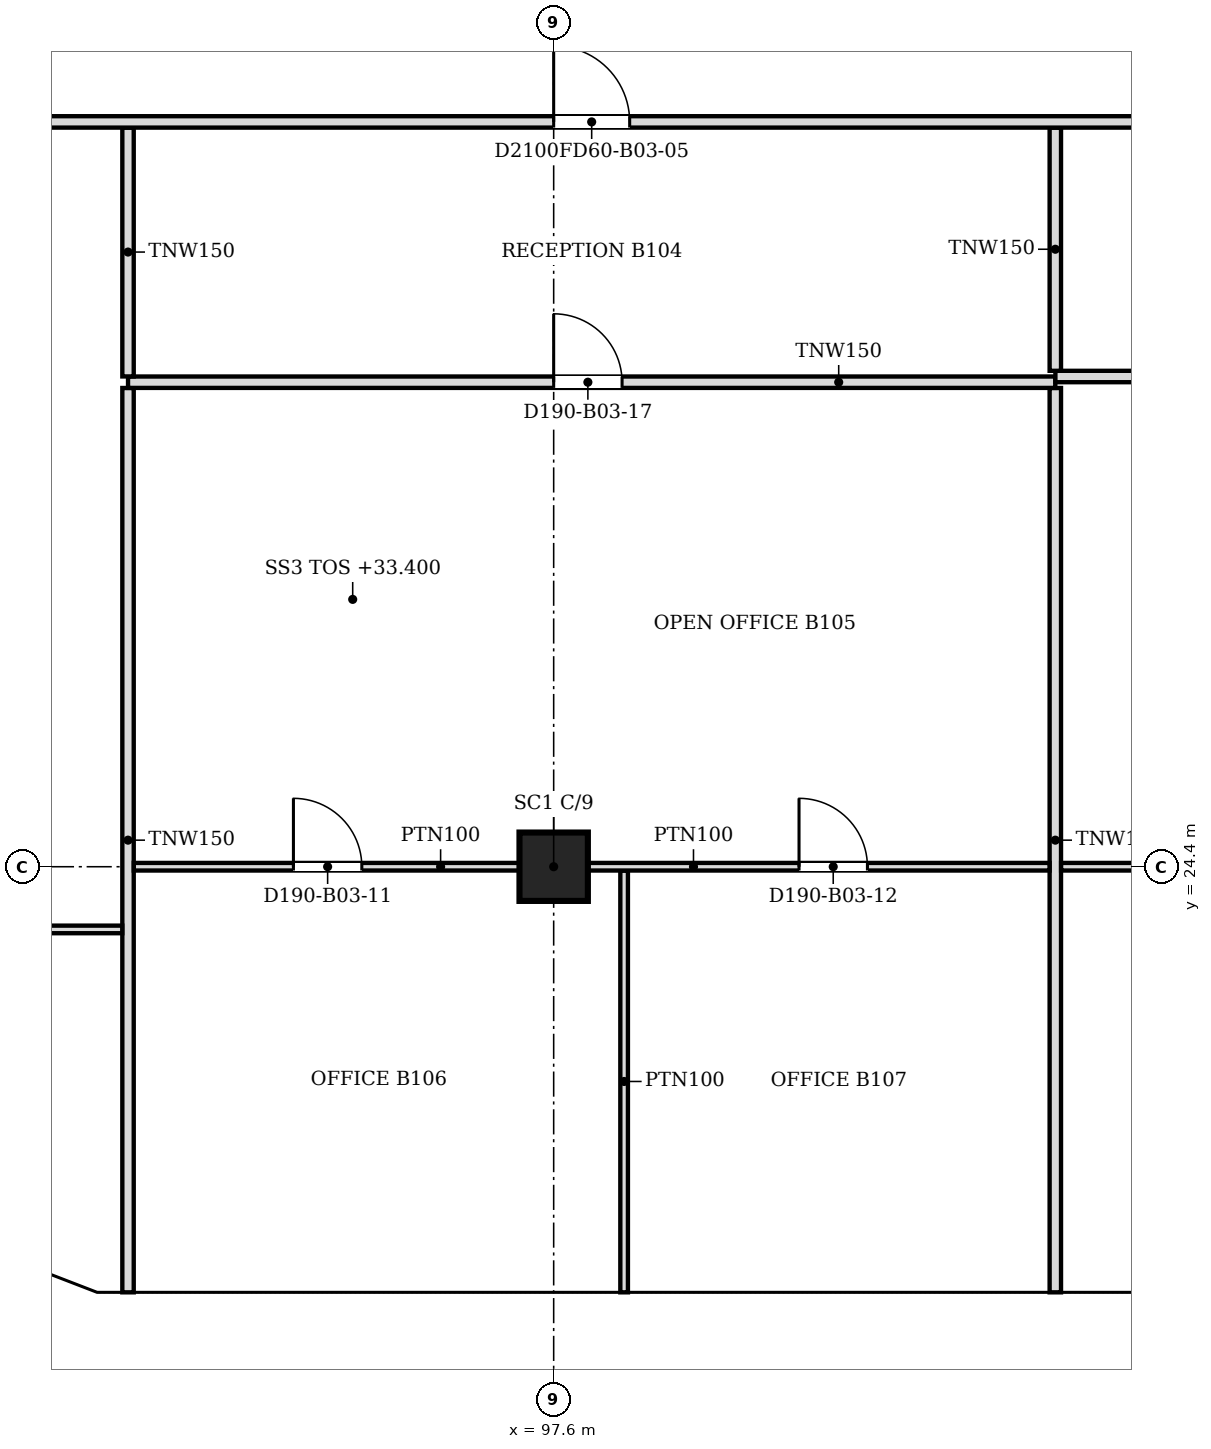
"""IFC4 building model, lengths in metres.
Left out: names, types, materials, properties, quantities, classifications, styles, units other than length and angle.
Written with IfcOpenShell. Run it as: python <this file> out.ifc"""

import sys

from ifc_helpers import new_model, si_unit, direction, frame, frame_2d, origin, origin_2d, place, context, subcontext, project, spatial, polyline, rectangle, outline, extrude, faceted_brep, source, transform, mapped, element, fill, save


model = new_model("IFC4")
c1 = context("Model", 3, precision=1e-05, world=origin(), true_north=direction((0.0, 1.0)))
c2 = subcontext(c1, "Body", "Model", "MODEL_VIEW")
j1 = project(units=[si_unit("LENGTHUNIT", "METRE"), si_unit("PLANEANGLEUNIT", "RADIAN")], contexts=[c1])
p1 = place(None, origin())
s1 = spatial("IfcSite", under=j1, at=p1, CompositionType="ELEMENT")
p2 = place(p1, origin())
s2 = spatial("IfcBuilding", under=s1, at=p2, CompositionType="ELEMENT")
p3 = place(p2, frame((0.0, 0.0, 33.4)))
s3 = spatial("IfcBuildingStorey", under=s2, at=p3, CompositionType="ELEMENT", Elevation=33.4)
p4 = place(p3, frame((97.6, 24.4, 0.0), z_axis=(0.0, 0.0, 1.0), x_axis=(1.0, 0.0, 0.0)))
e1 = element("IfcColumn", 1, at=p4, inside=s3, PredefinedType="COLUMN", context=c2, shape_type="SweptSolid", body=[
    extrude(rectangle(XDim=0.9, YDim=0.9, at=origin_2d()), origin(), (0.0, 0.0, 1.0), 3.6),
])
m1 = source(origin(), c2, "Body", "Brep", [
    faceted_brep([(0.047, -0.25, 0.0), (3.05, -0.25, 3.8), (0.047, -0.25, 7.6), (0.0, -0.25, 7.54), (0.0, -0.25, 0.06), (0.093, 0.25, 7.541), (3.05, 0.25, 3.8), (0.093, 0.25, 0.059), (0.047, 0.0, 0.0), (0.047, 0.0, 7.6)], [[[0, 1, 2, 3, 4]], [[5, 6, 7]], [[7, 6, 1, 0, 8]], [[6, 5, 9, 2, 1]], [[3, 2, 9]], [[8, 0, 4]], [[7, 8, 4, 3, 9, 5]]]),
])
p5 = place(p3, frame((91.5, 18.55, -3.8), z_axis=(0.0, 0.0, 1.0), x_axis=(1.0, 0.0, 0.0)))
e2 = element("IfcWall", 2, at=p5, inside=s3, PredefinedType="SOLIDWALL", context=c2, shape_type="MappedRepresentation", body=[
    mapped(m1, transform((0.0, 0.0, 0.0), scale=1.0)),
])
m2 = source(origin(), c2, "Body", "SweptSolid", [
    extrude(outline(polyline([(0.247, 0.656), (2.731, 3.8), (0.247, 6.944), (0.247, 0.656)])), frame((0.0, 0.26, 0.0), z_axis=(0.0, -1.0, 0.0), x_axis=(1.0, 0.0, 0.0)), (0.0, 0.0, 1.0), 0.52),
])
p6 = place(p5, origin())
e3 = element("IfcOpeningElement", 3, at=p6, cuts=e2, PredefinedType="OPENING", context=c2, shape_type="MappedRepresentation", body=[
    mapped(m2, transform((0.0, 0.0, 0.0), scale=1.0)),
])
m3 = source(origin(), c2, "Body", "Brep", [
    faceted_brep([(2.95, -0.25, 0.0), (2.997, -0.25, 0.059), (2.997, -0.25, 7.541), (2.95, -0.25, 7.6), (0.0, -0.25, 3.8), (0.053, 0.25, 3.868), (2.904, 0.25, 7.54), (2.904, 0.25, 0.06), (0.053, 0.25, 3.732), (2.95, 0.0, 0.0), (2.95, 0.0, 7.6), (0.0, 0.0, 3.8)], [[[0, 1, 2, 3, 4]], [[5, 6, 7, 8]], [[1, 0, 9]], [[10, 3, 2]], [[6, 5, 11, 4, 3, 10]], [[8, 7, 9, 0, 4, 11]], [[8, 11, 5]], [[1, 9, 7, 6, 10, 2]]]),
])
p7 = place(p3, frame((88.794, 19.612, -3.8), z_axis=(0.0, 0.0, 1.0), x_axis=(0.933000876937, -0.359874094142, 0.0)))
e4 = element("IfcWall", 4, at=p7, inside=s3, PredefinedType="SOLIDWALL", context=c2, shape_type="MappedRepresentation", body=[
    mapped(m3, transform((0.0, 0.0, 0.0), scale=1.0)),
])
m4 = source(origin(), c2, "Body", "SweptSolid", [
    extrude(outline(polyline([(2.75, 6.935), (0.316, 3.8), (2.75, 0.665), (2.75, 6.935)])), frame((0.0, 0.26, 0.0), z_axis=(0.0, -1.0, 0.0), x_axis=(1.0, 0.0, 0.0)), (0.0, 0.0, 1.0), 0.52),
])
p8 = place(p7, origin())
e5 = element("IfcOpeningElement", 5, at=p8, cuts=e4, PredefinedType="OPENING", context=c2, shape_type="MappedRepresentation", body=[
    mapped(m4, transform((0.0, 0.0, 0.0), scale=1.0)),
])
m5 = source(origin(), c2, "Body", "Brep", [
    faceted_brep([(3.05, -0.25, 0.0), (6.1, -0.25, 3.8), (6.1, -0.25, 3.8), (3.05, -0.25, 7.6), (0.0, -0.25, 3.8), (0.0, 0.25, 3.8), (3.05, 0.25, 7.6), (6.1, 0.25, 3.8), (6.1, 0.25, 3.8), (3.05, 0.25, 0.0)], [[[0, 1, 2, 3, 4]], [[5, 6, 7, 8, 9]], [[9, 8, 1, 0]], [[7, 6, 3, 2]], [[6, 5, 4, 3]], [[5, 9, 0, 4]], [[1, 8, 7, 2]]]),
])
p9 = place(p3, frame((94.55, 18.55, -3.8), z_axis=(0.0, 0.0, 1.0), x_axis=(1.0, 0.0, 0.0)))
e6 = element("IfcWall", 6, at=p9, inside=s3, PredefinedType="SOLIDWALL", context=c2, shape_type="MappedRepresentation", body=[
    mapped(m5, transform((0.0, 0.0, 0.0), scale=1.0)),
])
m6 = source(origin(), c2, "Body", "SweptSolid", [
    extrude(outline(polyline([(3.05, 0.399), (5.78, 3.8), (3.05, 7.2), (0.321, 3.8), (3.05, 0.399)])), frame((0.0, 0.26, 0.0), z_axis=(0.0, -1.0, 0.0), x_axis=(1.0, 0.0, 0.0)), (0.0, 0.0, 1.0), 0.52),
])
p10 = place(p9, origin())
e7 = element("IfcOpeningElement", 7, at=p10, cuts=e6, PredefinedType="OPENING", context=c2, shape_type="MappedRepresentation", body=[
    mapped(m6, transform((0.0, 0.0, 0.0), scale=1.0)),
])
m7 = source(origin(), c2, "Body", "SweptSolid", [
    extrude(outline(polyline([(3.05, 0.0), (6.1, 3.8), (3.05, 7.6), (0.0, 3.8), (3.05, 0.0)])), frame((0.0, 0.25, 0.0), z_axis=(0.0, -1.0, 0.0), x_axis=(1.0, 0.0, 0.0)), (0.0, 0.0, 1.0), 0.5),
])
p11 = place(p3, frame((100.65, 18.55, -3.8), z_axis=(0.0, 0.0, 1.0), x_axis=(1.0, 0.0, 0.0)))
e8 = element("IfcWall", 8, at=p11, inside=s3, PredefinedType="SOLIDWALL", context=c2, shape_type="MappedRepresentation", body=[
    mapped(m7, transform((0.0, 0.0, 0.0), scale=1.0)),
])
p12 = place(p11, origin())
e9 = element("IfcOpeningElement", 9, at=p12, cuts=e8, PredefinedType="OPENING", context=c2, shape_type="MappedRepresentation", body=[
    mapped(m6, transform((0.0, 0.0, 0.0), scale=1.0)),
])
p13 = place(p2, frame((0.0, 0.0, 37.2)))
s4 = spatial("IfcBuildingStorey", under=s2, at=p13, CompositionType="ELEMENT", Elevation=37.2)
m8 = source(origin(), c2, "Body", "Brep", [
    faceted_brep([(3.003, -0.25, 0.0), (6.053, -0.25, 3.8), (3.003, -0.25, 7.6), (0.0, -0.25, 3.8), (0.047, 0.25, 3.859), (3.003, 0.25, 7.6), (6.053, 0.25, 3.8), (3.003, 0.25, 0.0), (0.047, 0.25, 3.741), (0.0, 0.0, 3.8)], [[[0, 1, 2, 3]], [[4, 5, 6, 7, 8]], [[7, 6, 1, 0]], [[6, 5, 2, 1]], [[5, 4, 9, 3, 2]], [[8, 7, 0, 3, 9]], [[8, 9, 4]]]),
])
p14 = place(p13, frame((91.547, 18.55, -3.8), z_axis=(0.0, 0.0, 1.0), x_axis=(1.0, 0.0, 0.0)))
e10 = element("IfcWall", 10, at=p14, inside=s4, PredefinedType="SOLIDWALL", context=c2, shape_type="MappedRepresentation", body=[
    mapped(m8, transform((0.0, 0.0, 0.0), scale=1.0)),
])
m9 = source(origin(), c2, "Body", "SweptSolid", [
    extrude(outline(polyline([(3.005, 0.401), (5.733, 3.8), (3.005, 7.199), (0.319, 3.8), (3.005, 0.401)])), frame((0.0, 0.26, 0.0), z_axis=(0.0, -1.0, 0.0), x_axis=(1.0, 0.0, 0.0)), (0.0, 0.0, 1.0), 0.52),
])
p15 = place(p14, origin())
e11 = element("IfcOpeningElement", 11, at=p15, cuts=e10, PredefinedType="OPENING", context=c2, shape_type="MappedRepresentation", body=[
    mapped(m9, transform((0.0, 0.0, 0.0), scale=1.0)),
])
m10 = source(origin(), c2, "Body", "Brep", [
    faceted_brep([(3.05, -0.25, 0.0), (6.1, -0.25, 3.8), (6.1, -0.25, 3.8), (3.05, -0.25, 7.6), (0.0, -0.25, 3.8), (0.0, 0.25, 3.8), (3.05, 0.25, 7.6), (6.1, 0.25, 3.8), (6.1, 0.25, 3.8), (3.05, 0.25, 0.0)], [[[0, 1, 2, 3, 4]], [[5, 6, 7, 8, 9]], [[9, 8, 1, 0]], [[7, 6, 3, 2]], [[6, 5, 4, 3]], [[5, 9, 0, 4]], [[1, 8, 7, 2]]]),
])
p16 = place(p13, frame((97.6, 18.55, -3.8), z_axis=(0.0, 0.0, 1.0), x_axis=(1.0, 0.0, 0.0)))
e12 = element("IfcWall", 12, at=p16, inside=s4, PredefinedType="SOLIDWALL", context=c2, shape_type="MappedRepresentation", body=[
    mapped(m10, transform((0.0, 0.0, 0.0), scale=1.0)),
])
m11 = source(origin(), c2, "Body", "SweptSolid", [
    extrude(outline(polyline([(3.05, 0.399), (5.78, 3.8), (3.05, 7.201), (0.321, 3.8), (3.05, 0.399)])), frame((0.0, 0.26, 0.0), z_axis=(0.0, -1.0, 0.0), x_axis=(1.0, 0.0, 0.0)), (0.0, 0.0, 1.0), 0.52),
])
p17 = place(p16, origin())
e13 = element("IfcOpeningElement", 13, at=p17, cuts=e12, PredefinedType="OPENING", context=c2, shape_type="MappedRepresentation", body=[
    mapped(m11, transform((0.0, 0.0, 0.0), scale=1.0)),
])
m12 = source(origin(), c2, "Body", "SweptSolid", [
    extrude(outline(polyline([(3.05, 0.0), (6.1, 3.8), (3.05, 7.6), (0.0, 3.8), (3.05, 0.0)])), frame((0.0, 0.25, 0.0), z_axis=(0.0, -1.0, 0.0), x_axis=(1.0, 0.0, 0.0)), (0.0, 0.0, 1.0), 0.5),
])
p18 = place(p13, frame((103.7, 18.55, -3.8), z_axis=(0.0, 0.0, 1.0), x_axis=(1.0, 0.0, 0.0)))
e14 = element("IfcWall", 14, at=p18, inside=s4, PredefinedType="SOLIDWALL", context=c2, shape_type="MappedRepresentation", body=[
    mapped(m12, transform((0.0, 0.0, 0.0), scale=1.0)),
])
p19 = place(p18, origin())
e15 = element("IfcOpeningElement", 15, at=p19, cuts=e14, PredefinedType="OPENING", context=c2, shape_type="MappedRepresentation", body=[
    mapped(m11, transform((0.0, 0.0, 0.0), scale=1.0)),
])
m13 = source(origin(), c2, "Body", "Brep", [
    faceted_brep([(0.053, -0.25, 0.0), (3.003, -0.25, 3.8), (0.053, -0.25, 7.6), (0.0, -0.25, 7.532), (0.0, -0.25, 0.068), (0.106, 0.25, 7.532), (2.957, 0.25, 3.86), (2.957, 0.25, 3.74), (0.106, 0.25, 0.068), (3.003, 0.0, 3.8), (0.053, 0.0, 0.0), (0.053, 0.0, 7.6)], [[[0, 1, 2, 3, 4]], [[5, 6, 7, 8]], [[8, 7, 9, 1, 0, 10]], [[6, 5, 11, 2, 1, 9]], [[3, 2, 11]], [[10, 0, 4]], [[8, 10, 4, 3, 11, 5]], [[9, 7, 6]]]),
])
p20 = place(p13, frame((88.744, 19.631, -3.8), z_axis=(0.0, 0.0, 1.0), x_axis=(0.932997369089, -0.359883188373, 0.0)))
e16 = element("IfcWall", 16, at=p20, inside=s4, PredefinedType="SOLIDWALL", context=c2, shape_type="MappedRepresentation", body=[
    mapped(m13, transform((0.0, 0.0, 0.0), scale=1.0)),
])
m14 = source(origin(), c2, "Body", "SweptSolid", [
    extrude(outline(polyline([(0.253, 0.665), (2.687, 3.8), (0.253, 6.935), (0.253, 0.665)])), frame((0.0, 0.26, 0.0), z_axis=(0.0, -1.0, 0.0), x_axis=(1.0, 0.0, 0.0)), (0.0, 0.0, 1.0), 0.52),
])
p21 = place(p20, origin())
e17 = element("IfcOpeningElement", 17, at=p21, cuts=e16, PredefinedType="OPENING", context=c2, shape_type="MappedRepresentation", body=[
    mapped(m14, transform((0.0, 0.0, 0.0), scale=1.0)),
])
p22 = place(p3, frame((92.0, 18.8, 0.0), z_axis=(0.0, 0.0, 1.0), x_axis=(0.0, 1.0, 0.0)))
e18 = element("IfcWall", 18, at=p22, inside=s3, PredefinedType="PARTITIONING", context=c2, shape_type="SweptSolid", body=[
    extrude(rectangle(XDim=11.899, YDim=0.15, at=frame_2d((5.949, 0.0))), origin(), (0.0, 0.0, 1.0), 3.067),
])
p23 = place(p3, frame((98.527, 18.8, 0.0), z_axis=(0.0, 0.0, 1.0), x_axis=(0.0, 1.0, 0.0)))
e19 = element("IfcWall", 19, at=p23, inside=s3, PredefinedType="PARTITIONING", context=c2, shape_type="SweptSolid", body=[
    extrude(rectangle(XDim=5.549, YDim=0.1, at=frame_2d((2.774, 0.0))), origin(), (0.0, 0.0, 1.0), 3.067),
])
p24 = place(p3, frame((104.2, 18.8, 0.0), z_axis=(0.0, 0.0, 1.0), x_axis=(0.0, 1.0, 0.0)))
e20 = element("IfcWall", 20, at=p24, inside=s3, PredefinedType="PARTITIONING", context=c2, shape_type="SweptSolid", body=[
    extrude(rectangle(XDim=11.899, YDim=0.15, at=frame_2d((5.949, 0.0))), origin(), (0.0, 0.0, 1.0), 3.067),
])
p25 = place(p3, frame((91.924, 23.575, 0.0), z_axis=(0.0, 0.0, 1.0), x_axis=(-1.0, 0.0, 0.0)))
e21 = element("IfcWall", 21, at=p25, inside=s3, PredefinedType="PARTITIONING", context=c2, shape_type="SweptSolid", body=[
    extrude(rectangle(XDim=5.67, YDim=0.1, at=frame_2d((2.835, 0.0))), origin(), (0.0, 0.0, 1.0), 3.067),
])
m15 = source(origin(), c2, "Body", "SweptSolid", [
    extrude(rectangle(XDim=0.9, YDim=2.1, at=frame_2d((0.45, 1.05))), frame((0.0, 0.06, 0.0), z_axis=(0.0, -1.0, 0.0), x_axis=(1.0, 0.0, 0.0)), (0.0, 0.0, 1.0), 0.12),
])
p26 = place(p25, frame((2.37, 0.0, 0.0)))
e22 = element("IfcOpeningElement", 22, at=p26, cuts=e21, PredefinedType="OPENING", context=c2, shape_type="MappedRepresentation", body=[
    mapped(m15, transform((0.0, 0.0, 0.0), scale=1.0)),
])
p27 = place(p3, frame((97.149, 24.4, 0.0), z_axis=(0.0, 0.0, 1.0), x_axis=(-1.0, 0.0, 0.0)))
e23 = element("IfcWall", 23, at=p27, inside=s3, PredefinedType="PARTITIONING", context=c2, shape_type="SweptSolid", body=[
    extrude(rectangle(XDim=5.073, YDim=0.1, at=frame_2d((2.537, 0.0))), origin(), (0.0, 0.0, 1.0), 3.067),
])
p28 = place(p27, frame((2.073, 0.0, 0.0)))
e24 = element("IfcOpeningElement", 24, at=p28, cuts=e23, PredefinedType="OPENING", context=c2, shape_type="MappedRepresentation", body=[
    mapped(m15, transform((0.0, 0.0, 0.0), scale=1.0)),
])
p29 = place(p3, frame((104.124, 24.4, 0.0), z_axis=(0.0, 0.0, 1.0), x_axis=(-1.0, 0.0, 0.0)))
e25 = element("IfcWall", 25, at=p29, inside=s3, PredefinedType="PARTITIONING", context=c2, shape_type="SweptSolid", body=[
    extrude(rectangle(XDim=6.073, YDim=0.1, at=frame_2d((3.037, 0.0))), origin(), (0.0, 0.0, 1.0), 3.067),
])
p30 = place(p29, frame((2.396, 0.0, 0.0)))
e26 = element("IfcOpeningElement", 26, at=p30, cuts=e25, PredefinedType="OPENING", context=c2, shape_type="MappedRepresentation", body=[
    mapped(m15, transform((0.0, 0.0, 0.0), scale=1.0)),
])
p31 = place(p3, frame((109.349, 24.4, 0.0), z_axis=(0.0, 0.0, 1.0), x_axis=(-1.0, 0.0, 0.0)))
e27 = element("IfcWall", 27, at=p31, inside=s3, PredefinedType="PARTITIONING", context=c2, shape_type="SweptSolid", body=[
    extrude(rectangle(XDim=5.073, YDim=0.1, at=frame_2d((2.537, 0.0))), origin(), (0.0, 0.0, 1.0), 3.067),
])
p32 = place(p31, frame((2.073, 0.0, 0.0)))
e28 = element("IfcOpeningElement", 28, at=p32, cuts=e27, PredefinedType="OPENING", context=c2, shape_type="MappedRepresentation", body=[
    mapped(m15, transform((0.0, 0.0, 0.0), scale=1.0)),
])
p33 = place(p3, frame((104.2, 30.775, 0.0), z_axis=(0.0, 0.0, 1.0), x_axis=(-1.0, 0.0, 0.0)))
e29 = element("IfcWall", 29, at=p33, inside=s3, PredefinedType="PARTITIONING", context=c2, shape_type="SweptSolid", body=[
    extrude(rectangle(XDim=12.2, YDim=0.15, at=frame_2d((6.1, 0.0))), origin(), (0.0, 0.0, 1.0), 3.067),
])
m16 = source(origin(), c2, "Body", "SweptSolid", [
    extrude(rectangle(XDim=0.9, YDim=2.1, at=frame_2d((0.45, 1.05))), frame((0.0, 0.085, 0.0), z_axis=(0.0, -1.0, 0.0), x_axis=(1.0, 0.0, 0.0)), (0.0, 0.0, 1.0), 0.17),
])
p34 = place(p33, frame((5.7, 0.0, 0.0)))
e30 = element("IfcOpeningElement", 30, at=p34, cuts=e29, PredefinedType="OPENING", context=c2, shape_type="MappedRepresentation", body=[
    mapped(m16, transform((0.0, 0.0, 0.0), scale=1.0)),
])
p35 = place(p3, frame((92.0, 30.851, 0.0), z_axis=(0.0, 0.0, 1.0), x_axis=(0.0, 1.0, 0.0)))
e31 = element("IfcWall", 31, at=p35, inside=s3, PredefinedType="PARTITIONING", context=c2, shape_type="SweptSolid", body=[
    extrude(rectangle(XDim=3.273, YDim=0.15, at=frame_2d((1.636, 0.0))), origin(), (0.0, 0.0, 1.0), 3.067),
])
p36 = place(p3, frame((109.724, 30.85, 0.0), z_axis=(0.0, 0.0, 1.0), x_axis=(-1.0, 0.0, 0.0)))
e32 = element("IfcWall", 32, at=p36, inside=s3, PredefinedType="PARTITIONING", context=c2, shape_type="SweptSolid", body=[
    extrude(rectangle(XDim=5.523, YDim=0.15, at=frame_2d((2.762, 0.0))), origin(), (0.0, 0.0, 1.0), 3.067),
])
p37 = place(p36, frame((2.323, 0.0, 0.0)))
e33 = element("IfcOpeningElement", 33, at=p37, cuts=e32, PredefinedType="OPENING", context=c2, shape_type="MappedRepresentation", body=[
    mapped(m16, transform((0.0, 0.0, 0.0), scale=1.0)),
])
p38 = place(p3, frame((104.2, 30.925, 0.0), z_axis=(0.0, 0.0, 1.0), x_axis=(0.0, 1.0, 0.0)))
e34 = element("IfcWall", 34, at=p38, inside=s3, PredefinedType="PARTITIONING", context=c2, shape_type="SweptSolid", body=[
    extrude(rectangle(XDim=3.199, YDim=0.15, at=frame_2d((1.6, 0.0))), origin(), (0.0, 0.0, 1.0), 3.067),
])
p39 = place(p3, frame((133.7, 34.2, 0.0), z_axis=(0.0, 0.0, 1.0), x_axis=(-1.0, 0.0, 0.0)))
e35 = element("IfcWall", 35, at=p39, inside=s3, PredefinedType="PARTITIONING", context=c2, shape_type="SweptSolid", body=[
    extrude(rectangle(XDim=47.8, YDim=0.15, at=frame_2d((23.9, 0.0))), origin(), (0.0, 0.0, 1.0), 3.067),
])
p40 = place(p39, frame((2.099, 0.0, 0.0)))
e36 = element("IfcOpeningElement", 36, at=p40, cuts=e35, PredefinedType="OPENING", context=c2, shape_type="MappedRepresentation", body=[
    mapped(m16, transform((0.0, 0.0, 0.0), scale=1.0)),
])
m17 = source(origin(), c2, "Body", "SweptSolid", [
    extrude(rectangle(XDim=1.0, YDim=2.1, at=frame_2d((0.5, 1.05))), frame((0.0, 0.085, 0.0), z_axis=(0.0, -1.0, 0.0), x_axis=(1.0, 0.0, 0.0)), (0.0, 0.0, 1.0), 0.17),
])
p41 = place(p39, frame((26.199, 0.0, 0.0)))
e37 = element("IfcOpeningElement", 37, at=p41, cuts=e35, PredefinedType="OPENING", context=c2, shape_type="MappedRepresentation", body=[
    mapped(m17, transform((0.0, 0.0, 0.0), scale=1.0)),
])
p42 = place(p39, frame((44.3, 0.0, 0.0)))
e38 = element("IfcOpeningElement", 38, at=p42, cuts=e35, PredefinedType="OPENING", context=c2, shape_type="MappedRepresentation", body=[
    mapped(m16, transform((0.0, 0.0, 0.0), scale=1.0)),
])
p43 = place(p39, frame((9.249, 0.0, 0.0)))
e39 = element("IfcOpeningElement", 39, at=p43, cuts=e35, PredefinedType="OPENING", context=c2, shape_type="MappedRepresentation", body=[
    mapped(m16, transform((0.0, 0.0, 0.0), scale=1.0)),
])
p44 = place(p39, frame((18.6, 0.0, 0.0)))
e40 = element("IfcOpeningElement", 40, at=p44, cuts=e35, PredefinedType="OPENING", context=c2, shape_type="MappedRepresentation", body=[
    mapped(m17, transform((0.0, 0.0, 0.0), scale=1.0)),
])
p45 = place(p39, frame((35.1, 0.0, 0.0)))
e41 = element("IfcOpeningElement", 41, at=p45, cuts=e35, PredefinedType="OPENING", context=c2, shape_type="MappedRepresentation", body=[
    mapped(m17, transform((0.0, 0.0, 0.0), scale=1.0)),
])
m18 = source(origin(), c2, "Body", "SweptSolid", [
    extrude(rectangle(XDim=0.9, YDim=2.1, at=frame_2d((0.45, 1.05))), frame((0.0, 0.025, 0.0), z_axis=(0.0, -1.0, 0.0), x_axis=(1.0, 0.0, 0.0)), (0.0, 0.0, 1.0), 0.05),
])
p46 = place(p28, origin())
e42 = element("IfcDoor", 42, at=p46, inside=s3, OperationType="SINGLE_SWING_RIGHT", PredefinedType="DOOR", context=c2, shape_type="MappedRepresentation", body=[
    mapped(m18, transform((0.0, 0.0, 0.0), scale=1.0)),
])
fill(e24, e42)
p47 = place(p30, origin())
e43 = element("IfcDoor", 43, at=p47, inside=s3, OperationType="SINGLE_SWING_RIGHT", PredefinedType="DOOR", context=c2, shape_type="MappedRepresentation", body=[
    mapped(m18, transform((0.0, 0.0, 0.0), scale=1.0)),
])
fill(e26, e43)
m19 = source(origin(), c2, "Body", "SweptSolid", [
    extrude(rectangle(XDim=1.0, YDim=2.1, at=frame_2d((0.5, 1.05))), frame((0.0, 0.025, 0.0), z_axis=(0.0, -1.0, 0.0), x_axis=(1.0, 0.0, 0.0)), (0.0, 0.0, 1.0), 0.05),
])
p48 = place(p45, origin())
e44 = element("IfcDoor", 44, at=p48, inside=s3, OperationType="SINGLE_SWING_RIGHT", PredefinedType="DOOR", context=c2, shape_type="MappedRepresentation", body=[
    mapped(m19, transform((0.0, 0.0, 0.0), scale=1.0)),
])
fill(e41, e44)
p49 = place(p34, origin())
e45 = element("IfcDoor", 45, at=p49, inside=s3, OperationType="SINGLE_SWING_RIGHT", PredefinedType="DOOR", context=c2, shape_type="MappedRepresentation", body=[
    mapped(m18, transform((0.0, 0.0, 0.0), scale=1.0)),
])
fill(e30, e45)
save(model, sys.argv[1])
